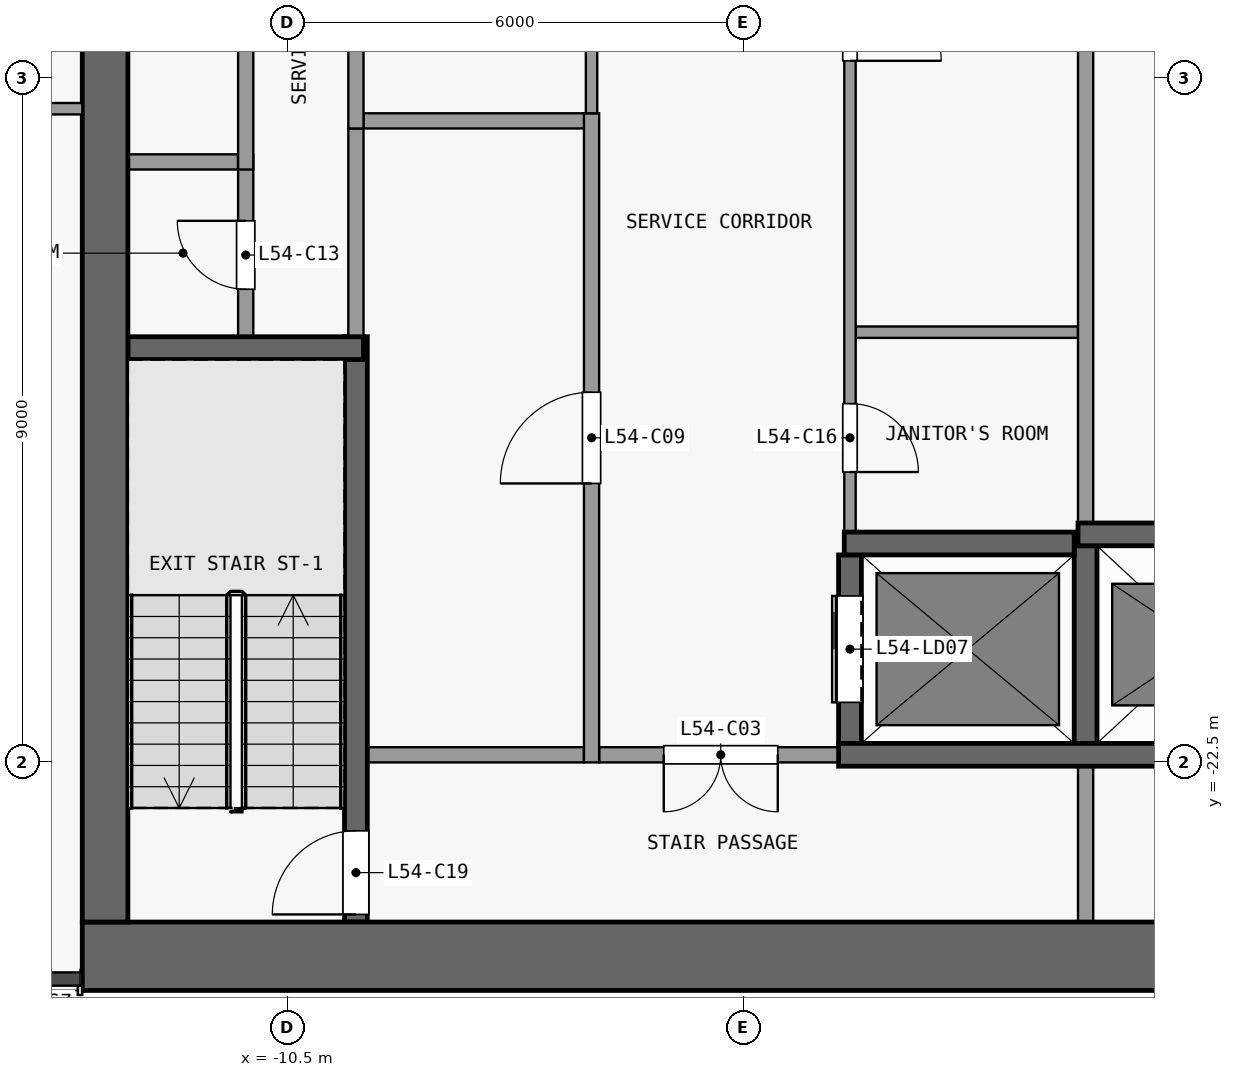
"""IFC4 building model, lengths in metres.
Left out: names, types, materials, properties, quantities, classifications, styles, units other than length and angle.
Written with IfcOpenShell. Run it as: python <this file> out.ifc"""

import sys

from ifc_helpers import new_model, si_unit, direction, frame, frame_2d, origin, place, context, subcontext, project, spatial, rectangle, extrude, element, fill, save


model = new_model("IFC4")
c1 = context("Model", 3, precision=1e-05, world=origin(), true_north=direction((0.0, 1.0)))
c2 = subcontext(c1, "Body", "Model", "MODEL_VIEW")
j1 = project(units=[si_unit("LENGTHUNIT", "METRE"), si_unit("PLANEANGLEUNIT", "RADIAN")], contexts=[c1])
p1 = place(None, origin())
s1 = spatial("IfcSite", under=j1, at=p1, CompositionType="ELEMENT")
p2 = place(p1, origin())
s2 = spatial("IfcBuilding", under=s1, at=p2, CompositionType="ELEMENT")
p3 = place(p2, frame((0.0, 0.0, 215.9)))
s3 = spatial("IfcBuildingStorey", under=s2, at=p3, CompositionType="ELEMENT", Elevation=215.9)
p4 = place(p3, frame((-13.2, -25.05, 0.0), z_axis=(0.0, 0.0, 1.0), x_axis=(1.0, 0.0, 0.0)))
e1 = element("IfcWall", 1, at=p4, inside=s3, PredefinedType="SHEAR", context=c2, shape_type="SweptSolid", body=[
    extrude(rectangle(XDim=26.4, YDim=0.9, at=frame_2d((13.2, 0.0))), origin(), (0.0, 0.0, 1.0), 3.3),
])
p5 = place(p3, frame((-12.9, -24.6, 0.0), z_axis=(0.0, 0.0, 1.0), x_axis=(0.0, 1.0, 0.0)))
e2 = element("IfcWall", 2, at=p5, inside=s3, PredefinedType="SHEAR", context=c2, shape_type="SweptSolid", body=[
    extrude(rectangle(XDim=16.1, YDim=0.6, at=frame_2d((8.05, 0.0))), origin(), (0.0, 0.0, 1.0), 3.3),
])
p6 = place(p3, frame((-9.45, -22.4, 0.0), z_axis=(0.0, 0.0, 1.0), x_axis=(1.0, 0.0, 0.0)))
e3 = element("IfcWall", 3, at=p6, inside=s3, PredefinedType="PARTITIONING", context=c2, shape_type="SweptSolid", body=[
    extrude(rectangle(XDim=2.85, YDim=0.2, at=frame_2d((1.425, 0.0))), origin(), (0.0, 0.0, 1.0), 3.3),
])
p7 = place(p3, frame((-3.25, -22.4, 0.0), z_axis=(0.0, 0.0, 1.0), x_axis=(-1.0, 0.0, 0.0)))
e4 = element("IfcWall", 4, at=p7, inside=s3, PredefinedType="PARTITIONING", context=c2, shape_type="SweptSolid", body=[
    extrude(rectangle(XDim=3.15, YDim=0.2, at=frame_2d((1.575, 0.0))), origin(), (0.0, 0.0, 1.0), 3.3),
])
p8 = place(p7, frame((0.8, 0.0, 0.0)))
e5 = element("IfcOpeningElement", 5, at=p8, cuts=e4, PredefinedType="OPENING", context=c2, shape_type="SweptSolid", body=[
    extrude(rectangle(XDim=1.5, YDim=2.1, at=frame_2d((0.75, 1.05))), frame((0.0, 0.11, 0.0), z_axis=(0.0, -1.0, 0.0), x_axis=(1.0, 0.0, 0.0)), (0.0, 0.0, 1.0), 0.22),
])
p9 = place(p3, frame((-3.25, -22.4, 0.0), z_axis=(0.0, 0.0, 1.0), x_axis=(1.0, 0.0, 0.0)))
e6 = element("IfcWall", 6, at=p9, inside=s3, PredefinedType="SHEAR", context=c2, shape_type="SweptSolid", body=[
    extrude(rectangle(XDim=6.5, YDim=0.3, at=frame_2d((3.25, 0.0))), origin(), (0.0, 0.0, 1.0), 3.3),
])
p10 = place(p3, frame((-3.175, -19.62, 0.0), z_axis=(0.0, 0.0, 1.0), x_axis=(1.0, 0.0, 0.0)))
e7 = element("IfcWall", 7, at=p10, inside=s3, PredefinedType="SHEAR", context=c2, shape_type="SweptSolid", body=[
    extrude(rectangle(XDim=3.025, YDim=0.3, at=frame_2d((1.513, 0.0))), origin(), (0.0, 0.0, 1.0), 3.3),
])
p11 = place(p3, frame((-0.1, -19.5, 0.0), z_axis=(0.0, 0.0, 1.0), x_axis=(1.0, 0.0, 0.0)))
e8 = element("IfcWall", 8, at=p11, inside=s3, PredefinedType="SHEAR", context=c2, shape_type="SweptSolid", body=[
    extrude(rectangle(XDim=3.3, YDim=0.3, at=frame_2d((1.65, 0.0))), origin(), (0.0, 0.0, 1.0), 3.3),
])
p12 = place(p3, frame((-12.6, -17.05, 0.0), z_axis=(0.0, 0.0, 1.0), x_axis=(1.0, 0.0, 0.0)))
e9 = element("IfcWall", 9, at=p12, inside=s3, PredefinedType="SHEAR", context=c2, shape_type="SweptSolid", body=[
    extrude(rectangle(XDim=3.1, YDim=0.3, at=frame_2d((1.55, 0.0))), origin(), (0.0, 0.0, 1.0), 3.3),
])
p13 = place(p3, frame((-3.025, -16.84, 0.0), z_axis=(0.0, 0.0, 1.0), x_axis=(1.0, 0.0, 0.0)))
e10 = element("IfcWall", 10, at=p13, inside=s3, PredefinedType="PARTITIONING", context=c2, shape_type="SweptSolid", body=[
    extrude(rectangle(XDim=2.925, YDim=0.15, at=frame_2d((1.462, 0.0))), origin(), (0.0, 0.0, 1.0), 3.3),
])
p14 = place(p3, frame((-12.6, -14.6, 0.0), z_axis=(0.0, 0.0, 1.0), x_axis=(1.0, 0.0, 0.0)))
e11 = element("IfcWall", 11, at=p14, inside=s3, PredefinedType="PARTITIONING", context=c2, shape_type="SweptSolid", body=[
    extrude(rectangle(XDim=1.45, YDim=0.2, at=frame_2d((0.725, 0.0))), origin(), (0.0, 0.0, 1.0), 3.3),
])
p15 = place(p3, frame((-9.5, -14.06, 0.0), z_axis=(0.0, 0.0, 1.0), x_axis=(1.0, 0.0, 0.0)))
e12 = element("IfcWall", 12, at=p15, inside=s3, PredefinedType="PARTITIONING", context=c2, shape_type="SweptSolid", body=[
    extrude(rectangle(XDim=3.075, YDim=0.2, at=frame_2d((1.538, 0.0))), origin(), (0.0, 0.0, 1.0), 3.3),
])
p16 = place(p3, frame((-11.05, -16.9, 0.0), z_axis=(0.0, 0.0, 1.0), x_axis=(0.0, 1.0, 0.0)))
e13 = element("IfcWall", 13, at=p16, inside=s3, PredefinedType="PARTITIONING", context=c2, shape_type="SweptSolid", body=[
    extrude(rectangle(XDim=2.4, YDim=0.2, at=frame_2d((1.2, 0.0))), origin(), (0.0, 0.0, 1.0), 3.3),
])
p17 = place(p16, frame((0.625, 0.0, 0.0)))
e14 = element("IfcOpeningElement", 14, at=p17, cuts=e13, PredefinedType="OPENING", context=c2, shape_type="SweptSolid", body=[
    extrude(rectangle(XDim=0.9, YDim=2.1, at=frame_2d((0.45, 1.05))), frame((0.0, 0.11, 0.0), z_axis=(0.0, -1.0, 0.0), x_axis=(1.0, 0.0, 0.0)), (0.0, 0.0, 1.0), 0.22),
])
p18 = place(p3, frame((-11.05, -14.7, 0.0), z_axis=(0.0, 0.0, 1.0), x_axis=(0.0, 1.0, 0.0)))
e15 = element("IfcWall", 15, at=p18, inside=s3, PredefinedType="PARTITIONING", context=c2, shape_type="SweptSolid", body=[
    extrude(rectangle(XDim=6.2, YDim=0.2, at=frame_2d((3.1, 0.0))), origin(), (0.0, 0.0, 1.0), 3.3),
])
p19 = place(p18, frame((2.7, 0.0, 0.0)))
e16 = element("IfcOpeningElement", 16, at=p19, cuts=e15, PredefinedType="OPENING", context=c2, shape_type="SweptSolid", body=[
    extrude(rectangle(XDim=0.9, YDim=2.1, at=frame_2d((0.45, 1.05))), frame((0.0, 0.11, 0.0), z_axis=(0.0, -1.0, 0.0), x_axis=(1.0, 0.0, 0.0)), (0.0, 0.0, 1.0), 0.22),
])
p20 = place(p3, frame((-9.6, -24.6, 0.0), z_axis=(0.0, 0.0, 1.0), x_axis=(0.0, 1.0, 0.0)))
e17 = element("IfcWall", 17, at=p20, inside=s3, PredefinedType="SHEAR", context=c2, shape_type="SweptSolid", body=[
    extrude(rectangle(XDim=7.7, YDim=0.3, at=frame_2d((3.85, 0.0))), origin(), (0.0, 0.0, 1.0), 3.3),
])
p21 = place(p20, frame((0.1, 0.0, 0.0)))
e18 = element("IfcOpeningElement", 18, at=p21, cuts=e17, PredefinedType="OPENING", context=c2, shape_type="SweptSolid", body=[
    extrude(rectangle(XDim=1.1, YDim=2.1, at=frame_2d((0.55, 1.05))), frame((0.0, 0.16, 0.0), z_axis=(0.0, -1.0, 0.0), x_axis=(1.0, 0.0, 0.0)), (0.0, 0.0, 1.0), 0.32),
])
p22 = place(p3, frame((-9.6, -16.9, 0.0), z_axis=(0.0, 0.0, 1.0), x_axis=(0.0, 1.0, 0.0)))
e19 = element("IfcWall", 19, at=p22, inside=s3, PredefinedType="PARTITIONING", context=c2, shape_type="SweptSolid", body=[
    extrude(rectangle(XDim=2.74, YDim=0.2, at=frame_2d((1.37, 0.0))), origin(), (0.0, 0.0, 1.0), 3.3),
])
p23 = place(p3, frame((-9.6, -14.16, 0.0), z_axis=(0.0, 0.0, 1.0), x_axis=(0.0, 1.0, 0.0)))
e20 = element("IfcWall", 20, at=p23, inside=s3, PredefinedType="PARTITIONING", context=c2, shape_type="SweptSolid", body=[
    extrude(rectangle(XDim=5.66, YDim=0.2, at=frame_2d((2.83, 0.0))), origin(), (0.0, 0.0, 1.0), 3.3),
])
p24 = place(p3, frame((-6.5, -22.5, 0.0), z_axis=(0.0, 0.0, 1.0), x_axis=(0.0, 1.0, 0.0)))
e21 = element("IfcWall", 21, at=p24, inside=s3, PredefinedType="PARTITIONING", context=c2, shape_type="SweptSolid", body=[
    extrude(rectangle(XDim=8.54, YDim=0.2, at=frame_2d((4.27, 0.0))), origin(), (0.0, 0.0, 1.0), 3.3),
])
p25 = place(p24, frame((3.67, 0.0, 0.0)))
e22 = element("IfcOpeningElement", 22, at=p25, cuts=e21, PredefinedType="OPENING", context=c2, shape_type="SweptSolid", body=[
    extrude(rectangle(XDim=1.2, YDim=2.1, at=frame_2d((0.6, 1.05))), frame((0.0, 0.11, 0.0), z_axis=(0.0, -1.0, 0.0), x_axis=(1.0, 0.0, 0.0)), (0.0, 0.0, 1.0), 0.22),
])
p26 = place(p3, frame((-6.5, -13.96, 0.0), z_axis=(0.0, 0.0, 1.0), x_axis=(0.0, 1.0, 0.0)))
e23 = element("IfcWall", 23, at=p26, inside=s3, PredefinedType="PARTITIONING", context=c2, shape_type="SweptSolid", body=[
    extrude(rectangle(XDim=5.46, YDim=0.15, at=frame_2d((2.73, 0.0))), origin(), (0.0, 0.0, 1.0), 3.3),
])
p27 = place(p26, frame((2.08, 0.0, 0.0)))
e24 = element("IfcOpeningElement", 24, at=p27, cuts=e23, PredefinedType="OPENING", context=c2, shape_type="SweptSolid", body=[
    extrude(rectangle(XDim=1.2, YDim=2.1, at=frame_2d((0.6, 1.05))), frame((0.0, 0.085, 0.0), z_axis=(0.0, -1.0, 0.0), x_axis=(1.0, 0.0, 0.0)), (0.0, 0.0, 1.0), 0.17),
])
p28 = place(p3, frame((-3.1, -22.25, 0.0), z_axis=(0.0, 0.0, 1.0), x_axis=(0.0, 1.0, 0.0)))
e25 = element("IfcWall", 25, at=p28, inside=s3, PredefinedType="SHEAR", context=c2, shape_type="SweptSolid", body=[
    extrude(rectangle(XDim=2.48, YDim=0.3, at=frame_2d((1.24, 0.0))), origin(), (0.0, 0.0, 1.0), 3.3),
])
p29 = place(p28, frame((0.54, 0.0, 0.0)))
e26 = element("IfcOpeningElement", 26, at=p29, cuts=e25, PredefinedType="OPENING", context=c2, shape_type="SweptSolid", body=[
    extrude(rectangle(XDim=1.4, YDim=2.1, at=frame_2d((0.7, 1.05))), frame((0.0, 0.16, 0.0), z_axis=(0.0, -1.0, 0.0), x_axis=(1.0, 0.0, 0.0)), (0.0, 0.0, 1.0), 0.32),
])
p30 = place(p3, frame((-3.1, -8.5, 0.0), z_axis=(0.0, 0.0, 1.0), x_axis=(0.0, -1.0, 0.0)))
e27 = element("IfcWall", 27, at=p30, inside=s3, PredefinedType="PARTITIONING", context=c2, shape_type="SweptSolid", body=[
    extrude(rectangle(XDim=10.97, YDim=0.15, at=frame_2d((5.485, 0.0))), origin(), (0.0, 0.0, 1.0), 3.3),
])
p31 = place(p30, frame((9.28, 0.0, 0.0)))
e28 = element("IfcOpeningElement", 28, at=p31, cuts=e27, PredefinedType="OPENING", context=c2, shape_type="SweptSolid", body=[
    extrude(rectangle(XDim=0.9, YDim=2.1, at=frame_2d((0.45, 1.05))), frame((0.0, 0.085, 0.0), z_axis=(0.0, -1.0, 0.0), x_axis=(1.0, 0.0, 0.0)), (0.0, 0.0, 1.0), 0.17),
])
p32 = place(p30, frame((3.57, 0.0, 0.0)))
e29 = element("IfcOpeningElement", 29, at=p32, cuts=e27, PredefinedType="OPENING", context=c2, shape_type="SweptSolid", body=[
    extrude(rectangle(XDim=1.2, YDim=2.1, at=frame_2d((0.6, 1.05))), frame((0.0, 0.085, 0.0), z_axis=(0.0, -1.0, 0.0), x_axis=(1.0, 0.0, 0.0)), (0.0, 0.0, 1.0), 0.17),
])
p33 = place(p3, frame((0.0, -24.6, 0.0), z_axis=(0.0, 0.0, 1.0), x_axis=(0.0, 1.0, 0.0)))
e30 = element("IfcWall", 30, at=p33, inside=s3, PredefinedType="PARTITIONING", context=c2, shape_type="SweptSolid", body=[
    extrude(rectangle(XDim=2.05, YDim=0.2, at=frame_2d((1.025, 0.0))), origin(), (0.0, 0.0, 1.0), 3.3),
])
p34 = place(p3, frame((0.0, -22.25, 0.0), z_axis=(0.0, 0.0, 1.0), x_axis=(0.0, 1.0, 0.0)))
e31 = element("IfcWall", 31, at=p34, inside=s3, PredefinedType="SHEAR", context=c2, shape_type="SweptSolid", body=[
    extrude(rectangle(XDim=2.6, YDim=0.3, at=frame_2d((1.3, 0.0))), origin(), (0.0, 0.0, 1.0), 3.3),
])
p35 = place(p3, frame((0.0, -19.35, 0.0), z_axis=(0.0, 0.0, 1.0), x_axis=(0.0, 1.0, 0.0)))
e32 = element("IfcWall", 32, at=p35, inside=s3, PredefinedType="PARTITIONING", context=c2, shape_type="SweptSolid", body=[
    extrude(rectangle(XDim=8.2, YDim=0.2, at=frame_2d((4.1, 0.0))), origin(), (0.0, 0.0, 1.0), 3.3),
])
p36 = place(p3, frame((-19.262, -13.9, 0.0), z_axis=(0.0, 0.0, 1.0), x_axis=(1.0, 0.0, 0.0)))
e33 = element("IfcWall", 33, at=p36, inside=s3, PredefinedType="PARTITIONING", context=c2, shape_type="SweptSolid", body=[
    extrude(rectangle(XDim=6.062, YDim=0.15, at=frame_2d((3.031, 0.0))), origin(), (0.0, 0.0, 1.0), 3.3),
])
p37 = place(p36, frame((4.162, 0.0, 0.0)))
e34 = element("IfcOpeningElement", 34, at=p37, cuts=e33, PredefinedType="OPENING", context=c2, shape_type="SweptSolid", body=[
    extrude(rectangle(XDim=0.9, YDim=2.1, at=frame_2d((0.45, 1.05))), frame((0.0, 0.085, 0.0), z_axis=(0.0, -1.0, 0.0), x_axis=(1.0, 0.0, 0.0)), (0.0, 0.0, 1.0), 0.17),
])
p38 = place(p29, origin())
e35 = element("IfcDoor", 35, at=p38, inside=s3, OperationType="DOUBLE_DOOR_SLIDING", PredefinedType="DOOR", context=c2, shape_type="SweptSolid", body=[
    extrude(rectangle(XDim=1.4, YDim=2.1, at=frame_2d((0.7, 1.05))), frame((0.0, 0.025, 0.0), z_axis=(0.0, -1.0, 0.0), x_axis=(1.0, 0.0, 0.0)), (0.0, 0.0, 1.0), 0.05),
])
fill(e26, e35)
p39 = place(p8, origin())
e36 = element("IfcDoor", 36, at=p39, inside=s3, OperationType="DOUBLE_DOOR_SINGLE_SWING", PredefinedType="DOOR", context=c2, shape_type="SweptSolid", body=[
    extrude(rectangle(XDim=1.5, YDim=2.1, at=frame_2d((0.75, 1.05))), frame((0.0, 0.025, 0.0), z_axis=(0.0, -1.0, 0.0), x_axis=(1.0, 0.0, 0.0)), (0.0, 0.0, 1.0), 0.05),
])
fill(e5, e36)
p40 = place(p25, origin())
e37 = element("IfcDoor", 37, at=p40, inside=s3, OperationType="SINGLE_SWING_LEFT", PredefinedType="DOOR", context=c2, shape_type="SweptSolid", body=[
    extrude(rectangle(XDim=1.2, YDim=2.1, at=frame_2d((0.6, 1.05))), frame((0.0, 0.025, 0.0), z_axis=(0.0, -1.0, 0.0), x_axis=(1.0, 0.0, 0.0)), (0.0, 0.0, 1.0), 0.05),
])
fill(e22, e37)
p41 = place(p17, origin())
e38 = element("IfcDoor", 38, at=p41, inside=s3, OperationType="SINGLE_SWING_RIGHT", PredefinedType="DOOR", context=c2, shape_type="SweptSolid", body=[
    extrude(rectangle(XDim=0.9, YDim=2.1, at=frame_2d((0.45, 1.05))), frame((0.0, 0.025, 0.0), z_axis=(0.0, -1.0, 0.0), x_axis=(1.0, 0.0, 0.0)), (0.0, 0.0, 1.0), 0.05),
])
fill(e14, e38)
p42 = place(p31, origin())
e39 = element("IfcDoor", 39, at=p42, inside=s3, OperationType="SINGLE_SWING_RIGHT", PredefinedType="DOOR", context=c2, shape_type="SweptSolid", body=[
    extrude(rectangle(XDim=0.9, YDim=2.1, at=frame_2d((0.45, 1.05))), frame((0.0, 0.025, 0.0), z_axis=(0.0, -1.0, 0.0), x_axis=(1.0, 0.0, 0.0)), (0.0, 0.0, 1.0), 0.05),
])
fill(e28, e39)
p43 = place(p32, origin())
e40 = element("IfcDoor", 40, at=p43, inside=s3, OperationType="SINGLE_SWING_RIGHT", PredefinedType="DOOR", context=c2, shape_type="SweptSolid", body=[
    extrude(rectangle(XDim=1.2, YDim=2.1, at=frame_2d((0.6, 1.05))), frame((0.0, 0.025, 0.0), z_axis=(0.0, -1.0, 0.0), x_axis=(1.0, 0.0, 0.0)), (0.0, 0.0, 1.0), 0.05),
])
fill(e29, e40)
p44 = place(p21, origin())
e41 = element("IfcDoor", 41, at=p44, inside=s3, OperationType="SINGLE_SWING_LEFT", PredefinedType="DOOR", context=c2, shape_type="SweptSolid", body=[
    extrude(rectangle(XDim=1.1, YDim=2.1, at=frame_2d((0.55, 1.05))), frame((0.0, 0.025, 0.0), z_axis=(0.0, -1.0, 0.0), x_axis=(1.0, 0.0, 0.0)), (0.0, 0.0, 1.0), 0.05),
])
fill(e18, e41)
save(model, sys.argv[1])
